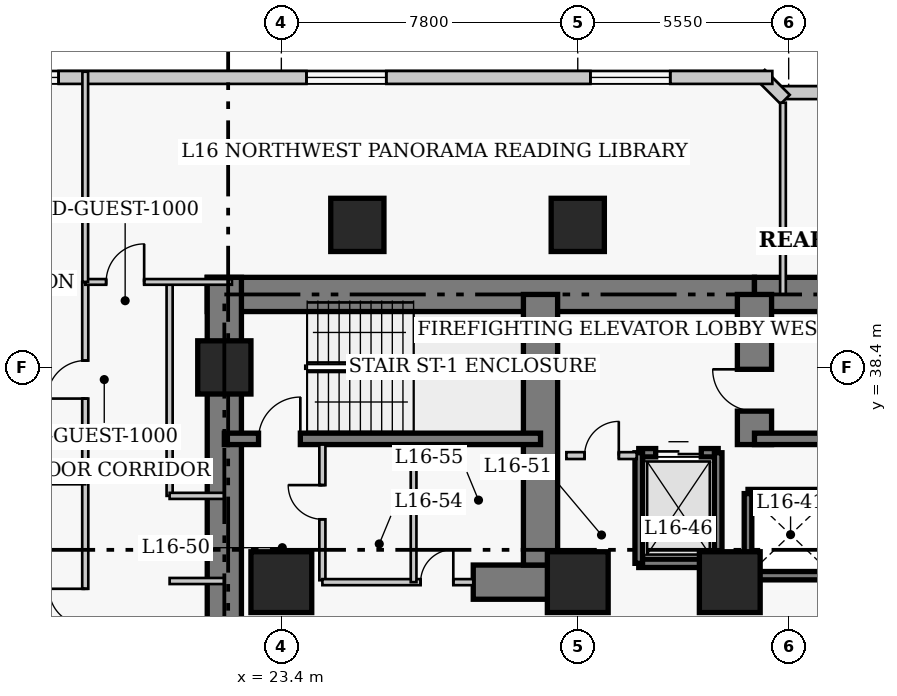
"""IFC4 building model, lengths in metres.
Left out: names, types, materials, properties, quantities, classifications, styles, units other than length and angle.
Written with IfcOpenShell. Run it as: python <this file> out.ifc"""

import sys

from ifc_helpers import new_model, si_unit, direction, frame, frame_2d, origin, origin_2d, place, context, subcontext, project, spatial, rectangle, extrude, element, fill, save


model = new_model("IFC4")
c1 = context("Model", 3, precision=1e-05, world=origin(), true_north=direction((0.0, 1.0)))
c2 = subcontext(c1, "Body", "Model", "MODEL_VIEW")
j1 = project(units=[si_unit("LENGTHUNIT", "METRE"), si_unit("PLANEANGLEUNIT", "RADIAN")], contexts=[c1])
p1 = place(None, origin())
s1 = spatial("IfcSite", under=j1, at=p1, CompositionType="ELEMENT")
p2 = place(p1, origin())
s2 = spatial("IfcBuilding", under=s1, at=p2, CompositionType="ELEMENT")
p3 = place(p2, frame((0.0, 0.0, 67.8)))
s3 = spatial("IfcBuildingStorey", under=s2, at=p3, CompositionType="ELEMENT", Elevation=67.8)
p4 = place(p3, frame((21.45, 40.32, 0.0), z_axis=(0.0, 0.0, 1.0), x_axis=(1.0, 0.0, 0.0)))
e1 = element("IfcWall", 1, at=p4, inside=s3, PredefinedType="SHEAR", context=c2, shape_type="SweptSolid", body=[
    extrude(rectangle(XDim=14.4, YDim=0.9, at=frame_2d((7.2, 0.0))), origin(), (0.0, 0.0, 1.0), 3.8),
])
p5 = place(p3, frame((35.85, 40.32, 0.0), z_axis=(0.0, 0.0, 1.0), x_axis=(1.0, 0.0, 0.0)))
e2 = element("IfcWall", 2, at=p5, inside=s3, PredefinedType="SHEAR", context=c2, shape_type="SweptSolid", body=[
    extrude(rectangle(XDim=12.6, YDim=0.9, at=frame_2d((6.3, 0.0))), origin(), (0.0, 0.0, 1.0), 3.8),
])
p6 = place(p3, frame((21.9, 27.05, 0.0), z_axis=(0.0, 0.0, 1.0), x_axis=(0.0, 1.0, 0.0)))
e3 = element("IfcWall", 3, at=p6, inside=s3, PredefinedType="SHEAR", context=c2, shape_type="SweptSolid", body=[
    extrude(rectangle(XDim=13.72, YDim=0.9, at=frame_2d((6.86, 0.0))), origin(), (0.0, 0.0, 1.0), 3.8),
])
p7 = place(p3, frame((28.45, 32.75, 0.0), z_axis=(0.0, 0.0, 1.0), x_axis=(1.0, 0.0, 0.0)))
e4 = element("IfcWall", 4, at=p7, inside=s3, PredefinedType="SHEAR", context=c2, shape_type="SweptSolid", body=[
    extrude(rectangle(XDim=2.4, YDim=0.9, at=frame_2d((1.2, 0.0))), origin(), (0.0, 0.0, 1.0), 3.8),
])
p8 = place(p3, frame((30.22, 33.2, 0.0), z_axis=(0.0, 0.0, 1.0), x_axis=(0.0, 1.0, 0.0)))
e5 = element("IfcWall", 5, at=p8, inside=s3, PredefinedType="SHEAR", context=c2, shape_type="SweptSolid", body=[
    extrude(rectangle(XDim=7.12, YDim=0.9, at=frame_2d((3.56, 0.0))), origin(), (0.0, 0.0, 1.0), 3.8),
])
p9 = place(p3, frame((35.85, 36.37, 0.0), z_axis=(0.0, 0.0, 1.0), x_axis=(0.0, 1.0, 0.0)))
e6 = element("IfcWall", 6, at=p9, inside=s3, PredefinedType="SHEAR", context=c2, shape_type="SweptSolid", body=[
    extrude(rectangle(XDim=3.95, YDim=0.9, at=frame_2d((1.975, 0.0))), origin(), (0.0, 0.0, 1.0), 3.8),
])
p10 = place(p9, frame((0.88, 0.0, 0.0)))
e7 = element("IfcOpeningElement", 7, at=p10, cuts=e6, PredefinedType="OPENING", context=c2, shape_type="SweptSolid", body=[
    extrude(rectangle(XDim=1.1, YDim=2.15, at=frame_2d((0.55, 1.075))), frame((0.0, 0.46, 0.0), z_axis=(0.0, -1.0, 0.0), x_axis=(1.0, 0.0, 0.0)), (0.0, 0.0, 1.0), 0.92),
])
p11 = place(p3, frame((21.9, 36.52, 0.0), z_axis=(0.0, 0.0, 1.0), x_axis=(1.0, 0.0, 0.0)))
e8 = element("IfcWall", 8, at=p11, inside=s3, PredefinedType="SHEAR", context=c2, shape_type="SweptSolid", body=[
    extrude(rectangle(XDim=8.32, YDim=0.3, at=frame_2d((4.16, 0.0))), origin(), (0.0, 0.0, 1.0), 3.8),
])
p12 = place(p11, frame((0.9, 0.0, 0.0)))
e9 = element("IfcOpeningElement", 9, at=p12, cuts=e8, PredefinedType="OPENING", context=c2, shape_type="SweptSolid", body=[
    extrude(rectangle(XDim=1.1, YDim=2.15, at=frame_2d((0.55, 1.075))), frame((0.0, 0.16, 0.0), z_axis=(0.0, -1.0, 0.0), x_axis=(1.0, 0.0, 0.0)), (0.0, 0.0, 1.0), 0.32),
])
p13 = place(p3, frame((35.85, 36.52, 0.0), z_axis=(0.0, 0.0, 1.0), x_axis=(1.0, 0.0, 0.0)))
e10 = element("IfcWall", 10, at=p13, inside=s3, PredefinedType="SHEAR", context=c2, shape_type="SweptSolid", body=[
    extrude(rectangle(XDim=8.33, YDim=0.3, at=frame_2d((4.165, 0.0))), origin(), (0.0, 0.0, 1.0), 3.8),
])
p14 = place(p3, frame((21.9, 38.4, 0.0), z_axis=(0.0, 0.0, 1.0), x_axis=(1.0, 0.0, 0.0)))
e11 = element("IfcColumn", 11, at=p14, inside=s3, PredefinedType="COLUMN", context=c2, shape_type="SweptSolid", body=[
    extrude(rectangle(XDim=1.4, YDim=1.4, at=origin_2d()), origin(), (0.0, 0.0, 1.0), 3.8),
])
for number, where, z_axis, x_axis in (
    (12, (23.4, 32.75, 0.0), (0.0, 0.0, 1.0), (1.0, 0.0, 0.0)),
    (13, (31.2, 32.75, 0.0), (0.0, 0.0, 1.0), (1.0, 0.0, 0.0)),
    (14, (35.2, 32.75, 0.0), (0.0, 0.0, 1.0), (1.0, 0.0, 0.0)),
):
    element("IfcColumn", number, at=place(p3, frame(where, z_axis=z_axis, x_axis=x_axis)), inside=s3, PredefinedType="COLUMN", context=c2, shape_type="SweptSolid", body=[
        extrude(rectangle(XDim=1.6, YDim=1.6, at=origin_2d()), origin(), (0.0, 0.0, 1.0), 3.8),
    ])
for number, where, z_axis, x_axis in (
    (15, (25.4, 42.15, 0.0), (0.0, 0.0, 1.0), (1.0, 0.0, 0.0)),
    (16, (31.2, 42.15, 0.0), (0.0, 0.0, 1.0), (1.0, 0.0, 0.0)),
):
    element("IfcColumn", number, at=place(p3, frame(where, z_axis=z_axis, x_axis=x_axis)), inside=s3, PredefinedType="COLUMN", context=c2, shape_type="SweptSolid", body=[
        extrude(rectangle(XDim=1.4, YDim=1.4, at=origin_2d()), origin(), (0.0, 0.0, 1.0), 3.8),
    ])
p15 = place(p3, frame((41.42, 45.63, 0.0), z_axis=(0.0, 0.0, 1.0), x_axis=(-1.0, 0.0, 0.0)))
e17 = element("IfcWall", 17, at=p15, inside=s3, PredefinedType="SOLIDWALL", context=c2, shape_type="SweptSolid", body=[
    extrude(rectangle(XDim=4.84, YDim=0.34, at=frame_2d((2.42, 0.0))), origin(), (0.0, 0.0, 1.0), 3.54),
])
p16 = place(p15, frame((1.37, 0.0, 0.85)))
e18 = element("IfcOpeningElement", 18, at=p16, cuts=e17, PredefinedType="OPENING", context=c2, shape_type="SweptSolid", body=[
    extrude(rectangle(XDim=2.1, YDim=1.85, at=frame_2d((1.05, 0.925))), frame((0.0, 0.18, 0.0), z_axis=(0.0, -1.0, 0.0), x_axis=(1.0, 0.0, 0.0)), (0.0, 0.0, 1.0), 0.36),
])
p17 = place(p3, frame((36.658, 45.451, 0.0), z_axis=(0.0, 0.0, 1.0), x_axis=(-0.707106781187, 0.707106781187, 0.0)))
e19 = element("IfcWall", 19, at=p17, inside=s3, PredefinedType="SOLIDWALL", context=c2, shape_type="SweptSolid", body=[
    extrude(rectangle(XDim=0.929, YDim=0.34, at=frame_2d((0.464, 0.0))), origin(), (0.0, 0.0, 1.0), 3.54),
])
p18 = place(p3, frame((36.32, 46.03, 0.0), z_axis=(0.0, 0.0, 1.0), x_axis=(-1.0, 0.0, 0.0)))
e20 = element("IfcWall", 20, at=p18, inside=s3, PredefinedType="SOLIDWALL", context=c2, shape_type="SweptSolid", body=[
    extrude(rectangle(XDim=29.89, YDim=0.34, at=frame_2d((14.945, 0.0))), origin(), (0.0, 0.0, 1.0), 3.54),
])
p19 = place(p18, frame((2.686, 0.0, 0.85)))
e21 = element("IfcOpeningElement", 21, at=p19, cuts=e20, PredefinedType="OPENING", context=c2, shape_type="SweptSolid", body=[
    extrude(rectangle(XDim=2.1, YDim=1.85, at=frame_2d((1.05, 0.925))), frame((0.0, 0.18, 0.0), z_axis=(0.0, -1.0, 0.0), x_axis=(1.0, 0.0, 0.0)), (0.0, 0.0, 1.0), 0.36),
])
p20 = place(p18, frame((10.159, 0.0, 0.85)))
e22 = element("IfcOpeningElement", 22, at=p20, cuts=e20, PredefinedType="OPENING", context=c2, shape_type="SweptSolid", body=[
    extrude(rectangle(XDim=2.1, YDim=1.85, at=frame_2d((1.05, 0.925))), frame((0.0, 0.18, 0.0), z_axis=(0.0, -1.0, 0.0), x_axis=(1.0, 0.0, 0.0)), (0.0, 0.0, 1.0), 0.36),
])
p21 = place(p18, frame((18.781, 0.0, 0.85)))
e23 = element("IfcOpeningElement", 23, at=p21, cuts=e20, PredefinedType="OPENING", context=c2, shape_type="SweptSolid", body=[
    extrude(rectangle(XDim=2.1, YDim=1.85, at=frame_2d((1.05, 0.925))), frame((0.0, 0.18, 0.0), z_axis=(0.0, -1.0, 0.0), x_axis=(1.0, 0.0, 0.0)), (0.0, 0.0, 1.0), 0.36),
])
p22 = place(p18, frame((25.104, 0.0, 0.85)))
e24 = element("IfcOpeningElement", 24, at=p22, cuts=e20, PredefinedType="OPENING", context=c2, shape_type="SweptSolid", body=[
    extrude(rectangle(XDim=2.1, YDim=1.85, at=frame_2d((1.05, 0.925))), frame((0.0, 0.18, 0.0), z_axis=(0.0, -1.0, 0.0), x_axis=(1.0, 0.0, 0.0)), (0.0, 0.0, 1.0), 0.36),
])
for number, where, z_axis, x_axis in (
    (25, (35.68, 35.08, 0.0), (0.0, 0.0, 1.0), (1.0, 0.0, 0.0)),
    (26, (35.68, 32.92, 0.0), (0.0, 0.0, 1.0), (1.0, 0.0, 0.0)),
):
    element("IfcWall", number, at=place(p3, frame(where, z_axis=z_axis, x_axis=x_axis)), inside=s3, PredefinedType="SHEAR", context=c2, shape_type="SweptSolid", body=[
        extrude(rectangle(XDim=2.32, YDim=0.22, at=frame_2d((1.16, 0.0))), origin(), (0.0, 0.0, 1.0), 3.8),
    ])
p23 = place(p3, frame((35.68, 32.92, 0.0), z_axis=(0.0, 0.0, 1.0), x_axis=(0.0, 1.0, 0.0)))
e27 = element("IfcWall", 27, at=p23, inside=s3, PredefinedType="SHEAR", context=c2, shape_type="SweptSolid", body=[
    extrude(rectangle(XDim=2.16, YDim=0.2, at=frame_2d((1.08, 0.0))), origin(), (0.0, 0.0, 1.0), 3.8),
])
p24 = place(p3, frame((32.805, 36.155, 0.0), z_axis=(0.0, 0.0, 1.0), x_axis=(1.0, 0.0, 0.0)))
e28 = element("IfcWall", 28, at=p24, inside=s3, PredefinedType="SHEAR", context=c2, shape_type="SweptSolid", body=[
    extrude(rectangle(XDim=2.09, YDim=0.22, at=frame_2d((1.045, 0.0))), origin(), (0.0, 0.0, 1.0), 3.8),
])
p25 = place(p24, frame((0.445, 0.0, 0.0)))
e29 = element("IfcOpeningElement", 29, at=p25, cuts=e28, PredefinedType="OPENING", context=c2, shape_type="SweptSolid", body=[
    extrude(rectangle(XDim=1.2, YDim=2.15, at=frame_2d((0.6, 1.075))), frame((0.0, 0.12, 0.0), z_axis=(0.0, -1.0, 0.0), x_axis=(1.0, 0.0, 0.0)), (0.0, 0.0, 1.0), 0.24),
])
p26 = place(p3, frame((32.805, 33.245, 0.0), z_axis=(0.0, 0.0, 1.0), x_axis=(1.0, 0.0, 0.0)))
e30 = element("IfcWall", 30, at=p26, inside=s3, PredefinedType="SHEAR", context=c2, shape_type="SweptSolid", body=[
    extrude(rectangle(XDim=2.09, YDim=0.22, at=frame_2d((1.045, 0.0))), origin(), (0.0, 0.0, 1.0), 3.8),
])
for number, where, z_axis, x_axis in (
    (31, (32.805, 33.245, 0.0), (0.0, 0.0, 1.0), (0.0, 1.0, 0.0)),
    (32, (34.895, 33.245, 0.0), (0.0, 0.0, 1.0), (0.0, 1.0, 0.0)),
):
    element("IfcWall", number, at=place(p3, frame(where, z_axis=z_axis, x_axis=x_axis)), inside=s3, PredefinedType="SHEAR", context=c2, shape_type="SweptSolid", body=[
        extrude(rectangle(XDim=2.91, YDim=0.2, at=frame_2d((1.455, 0.0))), origin(), (0.0, 0.0, 1.0), 3.8),
    ])
p27 = place(p3, frame((30.9, 36.08, 0.0), z_axis=(0.0, 0.0, 1.0), x_axis=(1.0, 0.0, 0.0)))
e33 = element("IfcWall", 33, at=p27, inside=s3, PredefinedType="PARTITIONING", context=c2, shape_type="SweptSolid", body=[
    extrude(rectangle(XDim=1.85, YDim=0.18, at=frame_2d((0.925, 0.0))), origin(), (0.0, 0.0, 1.0), 3.54),
])
p28 = place(p27, frame((0.48, 0.0, 0.0)))
e34 = element("IfcOpeningElement", 34, at=p28, cuts=e33, PredefinedType="OPENING", context=c2, shape_type="SweptSolid", body=[
    extrude(rectangle(XDim=0.9, YDim=2.15, at=frame_2d((0.45, 1.075))), frame((0.0, 0.1, 0.0), z_axis=(0.0, -1.0, 0.0), x_axis=(1.0, 0.0, 0.0)), (0.0, 0.0, 1.0), 0.2),
])
p29 = place(p3, frame((24.48, 32.8, 0.0), z_axis=(0.0, 0.0, 1.0), x_axis=(0.0, 1.0, 0.0)))
e35 = element("IfcWall", 35, at=p29, inside=s3, PredefinedType="PARTITIONING", context=c2, shape_type="SweptSolid", body=[
    extrude(rectangle(XDim=3.57, YDim=0.16, at=frame_2d((1.785, 0.0))), origin(), (0.0, 0.0, 1.0), 3.54),
])
p30 = place(p29, frame((1.604, 0.0, 0.0)))
e36 = element("IfcOpeningElement", 36, at=p30, cuts=e35, PredefinedType="OPENING", context=c2, shape_type="SweptSolid", body=[
    extrude(rectangle(XDim=0.9, YDim=2.1, at=frame_2d((0.45, 1.05))), frame((0.0, 0.09, 0.0), z_axis=(0.0, -1.0, 0.0), x_axis=(1.0, 0.0, 0.0)), (0.0, 0.0, 1.0), 0.18),
])
p31 = place(p3, frame((24.48, 32.75, 0.0), z_axis=(0.0, 0.0, 1.0), x_axis=(1.0, 0.0, 0.0)))
e37 = element("IfcWall", 37, at=p31, inside=s3, PredefinedType="PARTITIONING", context=c2, shape_type="SweptSolid", body=[
    extrude(rectangle(XDim=3.97, YDim=0.16, at=frame_2d((1.985, 0.0))), origin(), (0.0, 0.0, 1.0), 3.54),
])
p32 = place(p31, frame((2.585, 0.0, 0.0)))
e38 = element("IfcOpeningElement", 38, at=p32, cuts=e37, PredefinedType="OPENING", context=c2, shape_type="SweptSolid", body=[
    extrude(rectangle(XDim=0.86, YDim=2.05, at=frame_2d((0.43, 1.025))), frame((0.0, 0.09, 0.0), z_axis=(0.0, -1.0, 0.0), x_axis=(1.0, 0.0, 0.0)), (0.0, 0.0, 1.0), 0.18),
])
p33 = place(p3, frame((26.88, 32.75, 0.0), z_axis=(0.0, 0.0, 1.0), x_axis=(0.0, 1.0, 0.0)))
e39 = element("IfcWall", 39, at=p33, inside=s3, PredefinedType="PARTITIONING", context=c2, shape_type="SweptSolid", body=[
    extrude(rectangle(XDim=3.62, YDim=0.15, at=frame_2d((1.81, 0.0))), origin(), (0.0, 0.0, 1.0), 3.54),
])
p34 = place(p3, frame((18.24, 5.05, 0.0), z_axis=(0.0, 0.0, 1.0), x_axis=(0.0, 1.0, 0.0)))
e40 = element("IfcWall", 40, at=p34, inside=s3, PredefinedType="PARTITIONING", context=c2, shape_type="SweptSolid", body=[
    extrude(rectangle(XDim=35.6, YDim=0.16, at=frame_2d((17.8, 0.0))), origin(), (0.0, 0.0, 1.0), 3.54),
])
p35 = place(p34, frame((2.6, 0.0, 0.0)))
e41 = element("IfcOpeningElement", 41, at=p35, cuts=e40, PredefinedType="OPENING", context=c2, shape_type="SweptSolid", body=[
    extrude(rectangle(XDim=0.95, YDim=2.1, at=frame_2d((0.475, 1.05))), frame((0.0, 0.09, 0.0), z_axis=(0.0, -1.0, 0.0), x_axis=(1.0, 0.0, 0.0)), (0.0, 0.0, 1.0), 0.18),
])
p36 = place(p34, frame((10.075, 0.0, 0.0)))
e42 = element("IfcOpeningElement", 42, at=p36, cuts=e40, PredefinedType="OPENING", context=c2, shape_type="SweptSolid", body=[
    extrude(rectangle(XDim=0.95, YDim=2.1, at=frame_2d((0.475, 1.05))), frame((0.0, 0.09, 0.0), z_axis=(0.0, -1.0, 0.0), x_axis=(1.0, 0.0, 0.0)), (0.0, 0.0, 1.0), 0.18),
])
p37 = place(p34, frame((18.875, 0.0, 0.0)))
e43 = element("IfcOpeningElement", 43, at=p37, cuts=e40, PredefinedType="OPENING", context=c2, shape_type="SweptSolid", body=[
    extrude(rectangle(XDim=0.95, YDim=2.1, at=frame_2d((0.475, 1.05))), frame((0.0, 0.09, 0.0), z_axis=(0.0, -1.0, 0.0), x_axis=(1.0, 0.0, 0.0)), (0.0, 0.0, 1.0), 0.18),
])
p38 = place(p34, frame((26.575, 0.0, 0.0)))
e44 = element("IfcOpeningElement", 44, at=p38, cuts=e40, PredefinedType="OPENING", context=c2, shape_type="SweptSolid", body=[
    extrude(rectangle(XDim=0.95, YDim=2.1, at=frame_2d((0.475, 1.05))), frame((0.0, 0.09, 0.0), z_axis=(0.0, -1.0, 0.0), x_axis=(1.0, 0.0, 0.0)), (0.0, 0.0, 1.0), 0.18),
])
p39 = place(p34, frame((32.53, 0.0, 0.0)))
e45 = element("IfcOpeningElement", 45, at=p39, cuts=e40, PredefinedType="OPENING", context=c2, shape_type="SweptSolid", body=[
    extrude(rectangle(XDim=1.0, YDim=2.15, at=frame_2d((0.5, 1.075))), frame((0.0, 0.09, 0.0), z_axis=(0.0, -1.0, 0.0), x_axis=(1.0, 0.0, 0.0)), (0.0, 0.0, 1.0), 0.18),
])
p40 = place(p3, frame((20.46, 35.02, 0.0), z_axis=(0.0, 0.0, 1.0), x_axis=(0.0, 1.0, 0.0)))
e46 = element("IfcWall", 46, at=p40, inside=s3, PredefinedType="PARTITIONING", context=c2, shape_type="SweptSolid", body=[
    extrude(rectangle(XDim=5.63, YDim=0.16, at=frame_2d((2.815, 0.0))), origin(), (0.0, 0.0, 1.0), 3.54),
])
for number, where, z_axis, x_axis in (
    (47, (20.46, 35.02, 0.0), (0.0, 0.0, 1.0), (1.0, 0.0, 0.0)),
    (48, (20.46, 32.78, 0.0), (0.0, 0.0, 1.0), (1.0, 0.0, 0.0)),
):
    element("IfcWall", number, at=place(p3, frame(where, z_axis=z_axis, x_axis=x_axis)), inside=s3, PredefinedType="PARTITIONING", context=c2, shape_type="SweptSolid", body=[
        extrude(rectangle(XDim=1.44, YDim=0.16, at=frame_2d((0.72, 0.0))), origin(), (0.0, 0.0, 1.0), 3.54),
    ])
p41 = place(p3, frame((18.24, 40.65, 0.0), z_axis=(0.0, 0.0, 1.0), x_axis=(1.0, 0.0, 0.0)))
e49 = element("IfcWall", 49, at=p41, inside=s3, PredefinedType="PARTITIONING", context=c2, shape_type="SweptSolid", body=[
    extrude(rectangle(XDim=3.86, YDim=0.15, at=frame_2d((1.93, 0.0))), origin(), (0.0, 0.0, 1.0), 3.54),
])
p42 = place(p41, frame((0.55, 0.0, 0.0)))
e50 = element("IfcOpeningElement", 50, at=p42, cuts=e49, PredefinedType="OPENING", context=c2, shape_type="SweptSolid", body=[
    extrude(rectangle(XDim=1.0, YDim=2.15, at=frame_2d((0.5, 1.075))), frame((0.0, 0.085, 0.0), z_axis=(0.0, -1.0, 0.0), x_axis=(1.0, 0.0, 0.0)), (0.0, 0.0, 1.0), 0.17),
])
p43 = place(p3, frame((18.24, 40.65, 0.0), z_axis=(0.0, 0.0, 1.0), x_axis=(0.0, 1.0, 0.0)))
e51 = element("IfcWall", 51, at=p43, inside=s3, PredefinedType="PARTITIONING", context=c2, shape_type="SweptSolid", body=[
    extrude(rectangle(XDim=5.53, YDim=0.15, at=frame_2d((2.765, 0.0))), origin(), (0.0, 0.0, 1.0), 3.54),
])
p44 = place(p3, frame((36.6, 40.32, 0.0), z_axis=(0.0, 0.0, 1.0), x_axis=(0.0, 1.0, 0.0)))
e52 = element("IfcWall", 52, at=p44, inside=s3, PredefinedType="PARTITIONING", context=c2, shape_type="SweptSolid", body=[
    extrude(rectangle(XDim=5.045, YDim=0.15, at=frame_2d((2.522, 0.0))), origin(), (0.0, 0.0, 1.0), 3.54),
])
p45 = place(p3, frame((14.45, 35.4, 0.0), z_axis=(0.0, 0.0, 1.0), x_axis=(1.0, 0.0, 0.0)))
e53 = element("IfcWall", 53, at=p45, inside=s3, PredefinedType="PARTITIONING", context=c2, shape_type="SweptSolid", body=[
    extrude(rectangle(XDim=3.79, YDim=0.15, at=frame_2d((1.895, 0.0))), origin(), (0.0, 0.0, 1.0), 3.54),
])
p46 = place(p19, origin())
e54 = element("IfcWindow", 54, at=p46, inside=s3, PartitioningType="SINGLE_PANEL", PredefinedType="WINDOW", context=c2, shape_type="SweptSolid", body=[
    extrude(rectangle(XDim=2.1, YDim=1.85, at=frame_2d((1.05, 0.925))), frame((0.0, 0.03, 0.0), z_axis=(0.0, -1.0, 0.0), x_axis=(1.0, 0.0, 0.0)), (0.0, 0.0, 1.0), 0.06),
])
fill(e21, e54)
p47 = place(p20, origin())
e55 = element("IfcWindow", 55, at=p47, inside=s3, PartitioningType="SINGLE_PANEL", PredefinedType="WINDOW", context=c2, shape_type="SweptSolid", body=[
    extrude(rectangle(XDim=2.1, YDim=1.85, at=frame_2d((1.05, 0.925))), frame((0.0, 0.03, 0.0), z_axis=(0.0, -1.0, 0.0), x_axis=(1.0, 0.0, 0.0)), (0.0, 0.0, 1.0), 0.06),
])
fill(e22, e55)
p48 = place(p21, origin())
e56 = element("IfcWindow", 56, at=p48, inside=s3, PartitioningType="SINGLE_PANEL", PredefinedType="WINDOW", context=c2, shape_type="SweptSolid", body=[
    extrude(rectangle(XDim=2.1, YDim=1.85, at=frame_2d((1.05, 0.925))), frame((0.0, 0.03, 0.0), z_axis=(0.0, -1.0, 0.0), x_axis=(1.0, 0.0, 0.0)), (0.0, 0.0, 1.0), 0.06),
])
fill(e23, e56)
p49 = place(p25, origin())
e57 = element("IfcDoor", 57, at=p49, inside=s3, OperationType="DOUBLE_DOOR_SLIDING", PredefinedType="DOOR", context=c2, shape_type="SweptSolid", body=[
    extrude(rectangle(XDim=1.2, YDim=2.15, at=frame_2d((0.6, 1.075))), frame((0.0, 0.025, 0.0), z_axis=(0.0, -1.0, 0.0), x_axis=(1.0, 0.0, 0.0)), (0.0, 0.0, 1.0), 0.05),
])
fill(e29, e57)
p50 = place(p28, origin())
e58 = element("IfcDoor", 58, at=p50, inside=s3, OperationType="SINGLE_SWING_RIGHT", PredefinedType="DOOR", context=c2, shape_type="SweptSolid", body=[
    extrude(rectangle(XDim=0.9, YDim=2.15, at=frame_2d((0.45, 1.075))), frame((0.0, 0.025, 0.0), z_axis=(0.0, -1.0, 0.0), x_axis=(1.0, 0.0, 0.0)), (0.0, 0.0, 1.0), 0.05),
])
fill(e34, e58)
p51 = place(p30, origin())
e59 = element("IfcDoor", 59, at=p51, inside=s3, OperationType="SINGLE_SWING_RIGHT", PredefinedType="DOOR", context=c2, shape_type="SweptSolid", body=[
    extrude(rectangle(XDim=0.9, YDim=2.1, at=frame_2d((0.45, 1.05))), frame((0.0, 0.025, 0.0), z_axis=(0.0, -1.0, 0.0), x_axis=(1.0, 0.0, 0.0)), (0.0, 0.0, 1.0), 0.05),
])
fill(e36, e59)
p52 = place(p32, origin())
e60 = element("IfcDoor", 60, at=p52, inside=s3, OperationType="SINGLE_SWING_RIGHT", PredefinedType="DOOR", context=c2, shape_type="SweptSolid", body=[
    extrude(rectangle(XDim=0.86, YDim=2.05, at=frame_2d((0.43, 1.025))), frame((0.0, 0.025, 0.0), z_axis=(0.0, -1.0, 0.0), x_axis=(1.0, 0.0, 0.0)), (0.0, 0.0, 1.0), 0.05),
])
fill(e38, e60)
p53 = place(p42, origin())
e61 = element("IfcDoor", 61, at=p53, inside=s3, OperationType="SINGLE_SWING_RIGHT", PredefinedType="DOOR", context=c2, shape_type="SweptSolid", body=[
    extrude(rectangle(XDim=1.0, YDim=2.15, at=frame_2d((0.5, 1.075))), frame((0.0, 0.025, 0.0), z_axis=(0.0, -1.0, 0.0), x_axis=(1.0, 0.0, 0.0)), (0.0, 0.0, 1.0), 0.05),
])
fill(e50, e61)
p54 = place(p38, origin())
e62 = element("IfcDoor", 62, at=p54, inside=s3, OperationType="SINGLE_SWING_RIGHT", PredefinedType="DOOR", context=c2, shape_type="SweptSolid", body=[
    extrude(rectangle(XDim=0.95, YDim=2.1, at=frame_2d((0.475, 1.05))), frame((0.0, 0.025, 0.0), z_axis=(0.0, -1.0, 0.0), x_axis=(1.0, 0.0, 0.0)), (0.0, 0.0, 1.0), 0.05),
])
fill(e44, e62)
p55 = place(p39, origin())
e63 = element("IfcDoor", 63, at=p55, inside=s3, OperationType="SINGLE_SWING_LEFT", PredefinedType="DOOR", context=c2, shape_type="SweptSolid", body=[
    extrude(rectangle(XDim=1.0, YDim=2.15, at=frame_2d((0.5, 1.075))), frame((0.0, 0.025, 0.0), z_axis=(0.0, -1.0, 0.0), x_axis=(1.0, 0.0, 0.0)), (0.0, 0.0, 1.0), 0.05),
])
fill(e45, e63)
p56 = place(p12, origin())
e64 = element("IfcDoor", 64, at=p56, inside=s3, OperationType="SINGLE_SWING_RIGHT", PredefinedType="DOOR", context=c2, shape_type="SweptSolid", body=[
    extrude(rectangle(XDim=1.1, YDim=2.15, at=frame_2d((0.55, 1.075))), frame((0.0, 0.025, 0.0), z_axis=(0.0, -1.0, 0.0), x_axis=(1.0, 0.0, 0.0)), (0.0, 0.0, 1.0), 0.05),
])
fill(e9, e64)
p57 = place(p10, origin())
e65 = element("IfcDoor", 65, at=p57, inside=s3, OperationType="SINGLE_SWING_RIGHT", PredefinedType="DOOR", context=c2, shape_type="SweptSolid", body=[
    extrude(rectangle(XDim=1.1, YDim=2.15, at=frame_2d((0.55, 1.075))), frame((0.0, 0.025, 0.0), z_axis=(0.0, -1.0, 0.0), x_axis=(1.0, 0.0, 0.0)), (0.0, 0.0, 1.0), 0.05),
])
fill(e7, e65)
save(model, sys.argv[1])
